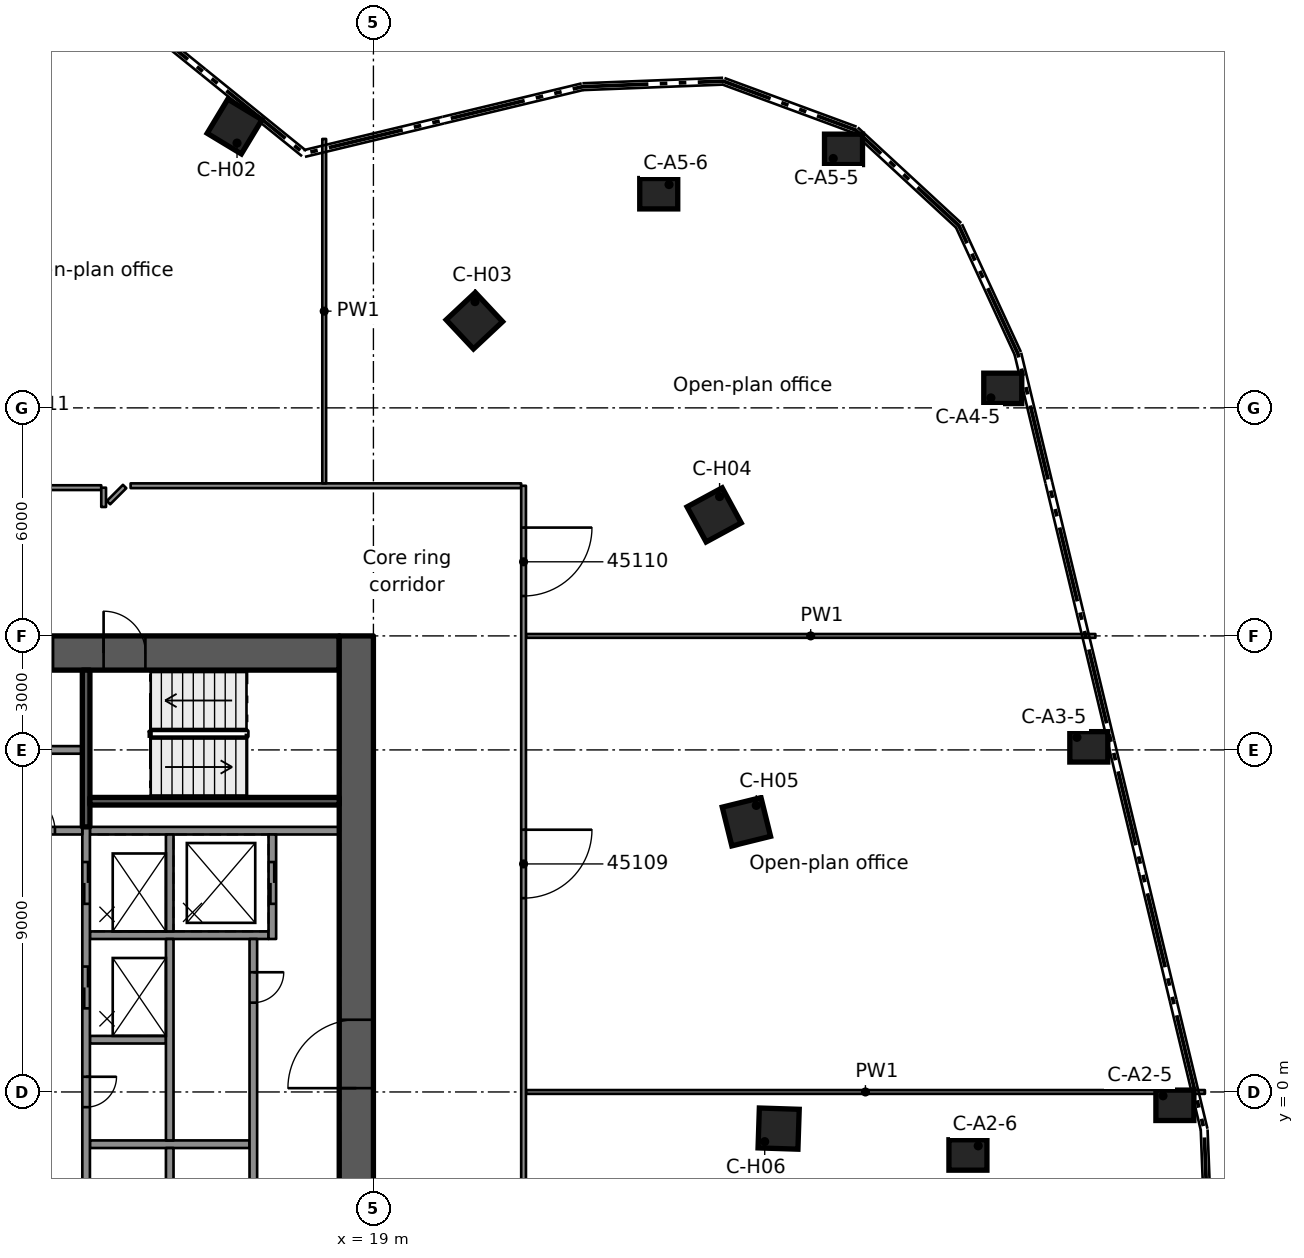
"""IFC4 building model, lengths in metres.
Left out: names, types, materials, properties, quantities, classifications, styles, units other than length and angle.
Written with IfcOpenShell. Run it as: python <this file> out.ifc"""

import sys

from ifc_helpers import new_model, si_unit, direction, frame, frame_2d, origin, origin_2d, place, context, subcontext, project, spatial, rectangle, extrude, element, fill, save


model = new_model("IFC4")
c1 = context("Model", 3, precision=1e-05, world=origin(), true_north=direction((0.0, 1.0)))
c2 = subcontext(c1, "Body", "Model", "MODEL_VIEW")
j1 = project(units=[si_unit("LENGTHUNIT", "METRE"), si_unit("PLANEANGLEUNIT", "RADIAN")], contexts=[c1])
p1 = place(None, origin())
s1 = spatial("IfcSite", under=j1, at=p1, CompositionType="ELEMENT")
p2 = place(p1, origin())
s2 = spatial("IfcBuilding", under=s1, at=p2, CompositionType="ELEMENT")
p3 = place(p2, frame((0.0, 0.0, 221.0)))
s3 = spatial("IfcBuildingStorey", under=s2, at=p3, CompositionType="ELEMENT", Elevation=221.0)
p4 = place(p3, frame((8.9, 11.55, 0.0), z_axis=(0.0, 0.0, 1.0), x_axis=(1.0, 0.0, 0.0)))
e1 = element("IfcWall", 1, at=p4, inside=s3, PredefinedType="SHEAR", context=c2, shape_type="SweptSolid", body=[
    extrude(rectangle(XDim=9.2, YDim=0.9, at=frame_2d((4.6, 0.0))), origin(), (0.0, 0.0, 1.0), 3.5),
])
p5 = place(p4, frame((3.0, 0.0, 0.0)))
e2 = element("IfcOpeningElement", 2, at=p5, cuts=e1, PredefinedType="OPENING", context=c2, shape_type="SweptSolid", body=[
    extrude(rectangle(XDim=1.1, YDim=2.1, at=frame_2d((0.55, 1.05))), frame((0.0, 0.46, 0.0), z_axis=(0.0, -1.0, 0.0), x_axis=(1.0, 0.0, 0.0)), (0.0, 0.0, 1.0), 0.92),
])
p6 = place(p4, frame((0.77, 0.0, 0.0)))
e3 = element("IfcOpeningElement", 3, at=p6, cuts=e1, PredefinedType="OPENING", context=c2, shape_type="SweptSolid", body=[
    extrude(rectangle(XDim=0.9, YDim=2.1, at=frame_2d((0.45, 1.05))), frame((0.0, 0.46, 0.0), z_axis=(0.0, -1.0, 0.0), x_axis=(1.0, 0.0, 0.0)), (0.0, 0.0, 1.0), 0.92),
])
p7 = place(p3, frame((18.55, -12.0, 0.0), z_axis=(0.0, 0.0, 1.0), x_axis=(0.0, 1.0, 0.0)))
e4 = element("IfcWall", 4, at=p7, inside=s3, PredefinedType="SHEAR", context=c2, shape_type="SweptSolid", body=[
    extrude(rectangle(XDim=24.0, YDim=0.9, at=frame_2d((12.0, 0.0))), origin(), (0.0, 0.0, 1.0), 3.5),
])
p8 = place(p7, frame((12.1, 0.0, 0.0)))
e5 = element("IfcOpeningElement", 5, at=p8, cuts=e4, PredefinedType="OPENING", context=c2, shape_type="SweptSolid", body=[
    extrude(rectangle(XDim=1.8, YDim=2.1, at=frame_2d((0.9, 1.05))), frame((0.0, 0.46, 0.0), z_axis=(0.0, -1.0, 0.0), x_axis=(1.0, 0.0, 0.0)), (0.0, 0.0, 1.0), 0.92),
])
for number, where, z_axis, x_axis in (
    (6, (40.09, -0.351, 0.0), (0.0, 0.0, 1.0), (1.0, 0.0, 0.0)),
    (7, (34.644, -1.658, 0.0), (0.0, 0.0, 1.0), (1.0, 0.0, 0.0)),
    (8, (37.825, 9.081, 0.0), (0.0, 0.0, 1.0), (1.0, 0.0, 0.0)),
    (9, (35.561, 18.513, 0.0), (0.0, 0.0, 1.0), (1.0, 0.0, 0.0)),
    (10, (31.37, 24.802, 0.0), (0.0, 0.0, 1.0), (1.0, 0.0, 0.0)),
    (11, (26.508, 23.635, 0.0), (0.0, 0.0, 1.0), (1.0, 0.0, 0.0)),
):
    element("IfcColumn", number, at=place(p3, frame(where, z_axis=z_axis, x_axis=x_axis)), inside=s3, PredefinedType="COLUMN", context=c2, shape_type="SweptSolid", body=[
        extrude(rectangle(XDim=1.0, YDim=0.8, at=origin_2d()), origin(), (0.0, 0.0, 1.0), 3.5),
    ])
for number, where, z_axis, x_axis in (
    (12, (15.347, 25.403, 0.0), (0.0, 0.0, 1.0), (0.517, 0.856, 0.0)),
    (13, (21.657, 20.293, 0.0), (0.0, 0.0, 1.0), (0.73, 0.684, 0.0)),
    (14, (27.966, 15.184, 0.0), (0.0, 0.0, 1.0), (0.879, 0.477, 0.0)),
    (15, (28.815, 7.11, 0.0), (0.0, 0.0, 1.0), (0.971, 0.24, 0.0)),
    (16, (29.663, -0.964, 0.0), (0.0, 0.0, 1.0), (0.999, -0.032, 0.0)),
):
    element("IfcColumn", number, at=place(p3, frame(where, z_axis=z_axis, x_axis=x_axis)), inside=s3, PredefinedType="COLUMN", context=c2, shape_type="SweptSolid", body=[
        extrude(rectangle(XDim=1.05, YDim=1.05, at=origin_2d()), origin(), (0.0, 0.0, 1.0), 3.5),
    ])
p9 = place(p3, frame((11.54, 6.875, 0.0), z_axis=(0.0, 0.0, 1.0), x_axis=(1.0, 0.0, 0.0)))
e17 = element("IfcWall", 17, at=p9, inside=s3, PredefinedType="SOLIDWALL", context=c2, shape_type="SweptSolid", body=[
    extrude(rectangle(XDim=6.56, YDim=0.2, at=frame_2d((3.28, 0.0))), origin(), (0.0, 0.0, 1.0), 3.08),
])
p10 = place(p3, frame((11.54, 4.125, 0.0), z_axis=(0.0, 0.0, 1.0), x_axis=(1.0, 0.0, 0.0)))
e18 = element("IfcWall", 18, at=p10, inside=s3, PredefinedType="SOLIDWALL", context=c2, shape_type="SweptSolid", body=[
    extrude(rectangle(XDim=4.7, YDim=0.2, at=frame_2d((2.35, 0.0))), origin(), (0.0, 0.0, 1.0), 3.08),
])
p11 = place(p3, frame((11.54, 1.375, 0.0), z_axis=(0.0, 0.0, 1.0), x_axis=(1.0, 0.0, 0.0)))
e19 = element("IfcWall", 19, at=p11, inside=s3, PredefinedType="SOLIDWALL", context=c2, shape_type="SweptSolid", body=[
    extrude(rectangle(XDim=2.0, YDim=0.2, at=frame_2d((1.0, 0.0))), origin(), (0.0, 0.0, 1.0), 3.08),
])
p12 = place(p3, frame((11.54, -1.375, 0.0), z_axis=(0.0, 0.0, 1.0), x_axis=(1.0, 0.0, 0.0)))
e20 = element("IfcWall", 20, at=p12, inside=s3, PredefinedType="SOLIDWALL", context=c2, shape_type="SweptSolid", body=[
    extrude(rectangle(XDim=4.2, YDim=0.2, at=frame_2d((2.1, 0.0))), origin(), (0.0, 0.0, 1.0), 3.08),
])
p13 = place(p3, frame((11.44, 6.975, 0.0), z_axis=(0.0, 0.0, 1.0), x_axis=(0.0, -1.0, 0.0)))
e21 = element("IfcWall", 21, at=p13, inside=s3, PredefinedType="SOLIDWALL", context=c2, shape_type="SweptSolid", body=[
    extrude(rectangle(XDim=13.95, YDim=0.2, at=frame_2d((6.975, 0.0))), origin(), (0.0, 0.0, 1.0), 3.08),
])
p14 = place(p13, frame((0.925, 0.0, 0.0)))
e22 = element("IfcOpeningElement", 22, at=p14, cuts=e21, PredefinedType="OPENING", context=c2, shape_type="SweptSolid", body=[
    extrude(rectangle(XDim=1.1, YDim=2.1, at=frame_2d((0.55, 1.05))), frame((0.0, 0.11, 0.0), z_axis=(0.0, -1.0, 0.0), x_axis=(1.0, 0.0, 0.0)), (0.0, 0.0, 1.0), 0.22),
])
p15 = place(p13, frame((3.675, 0.0, 0.0)))
e23 = element("IfcOpeningElement", 23, at=p15, cuts=e21, PredefinedType="OPENING", context=c2, shape_type="SweptSolid", body=[
    extrude(rectangle(XDim=1.1, YDim=2.1, at=frame_2d((0.55, 1.05))), frame((0.0, 0.11, 0.0), z_axis=(0.0, -1.0, 0.0), x_axis=(1.0, 0.0, 0.0)), (0.0, 0.0, 1.0), 0.22),
])
p16 = place(p13, frame((11.925, 0.0, 0.0)))
e24 = element("IfcOpeningElement", 24, at=p16, cuts=e21, PredefinedType="OPENING", context=c2, shape_type="SweptSolid", body=[
    extrude(rectangle(XDim=1.1, YDim=2.1, at=frame_2d((0.55, 1.05))), frame((0.0, 0.11, 0.0), z_axis=(0.0, -1.0, 0.0), x_axis=(1.0, 0.0, 0.0)), (0.0, 0.0, 1.0), 0.22),
])
p17 = place(p13, frame((6.575, 0.0, 0.0)))
e25 = element("IfcOpeningElement", 25, at=p17, cuts=e21, PredefinedType="OPENING", context=c2, shape_type="SweptSolid", body=[
    extrude(rectangle(XDim=0.8, YDim=2.1, at=frame_2d((0.4, 1.05))), frame((0.0, 0.11, 0.0), z_axis=(0.0, -1.0, 0.0), x_axis=(1.0, 0.0, 0.0)), (0.0, 0.0, 1.0), 0.22),
])
p18 = place(p13, frame((9.325, 0.0, 0.0)))
e26 = element("IfcOpeningElement", 26, at=p18, cuts=e21, PredefinedType="OPENING", context=c2, shape_type="SweptSolid", body=[
    extrude(rectangle(XDim=0.8, YDim=2.1, at=frame_2d((0.4, 1.05))), frame((0.0, 0.11, 0.0), z_axis=(0.0, -1.0, 0.0), x_axis=(1.0, 0.0, 0.0)), (0.0, 0.0, 1.0), 0.22),
])
p19 = place(p3, frame((13.64, 6.775, 0.0), z_axis=(0.0, 0.0, 1.0), x_axis=(0.0, -1.0, 0.0)))
e27 = element("IfcWall", 27, at=p19, inside=s3, PredefinedType="SOLIDWALL", context=c2, shape_type="SweptSolid", body=[
    extrude(rectangle(XDim=2.55, YDim=0.2, at=frame_2d((1.275, 0.0))), origin(), (0.0, 0.0, 1.0), 3.08),
])
p20 = place(p3, frame((13.64, 4.025, 0.0), z_axis=(0.0, 0.0, 1.0), x_axis=(0.0, -1.0, 0.0)))
e28 = element("IfcWall", 28, at=p20, inside=s3, PredefinedType="SOLIDWALL", context=c2, shape_type="SweptSolid", body=[
    extrude(rectangle(XDim=5.3, YDim=0.2, at=frame_2d((2.65, 0.0))), origin(), (0.0, 0.0, 1.0), 3.08),
])
p21 = place(p3, frame((13.64, -1.475, 0.0), z_axis=(0.0, 0.0, 1.0), x_axis=(0.0, -1.0, 0.0)))
e29 = element("IfcWall", 29, at=p21, inside=s3, PredefinedType="SOLIDWALL", context=c2, shape_type="SweptSolid", body=[
    extrude(rectangle(XDim=2.55, YDim=0.2, at=frame_2d((1.275, 0.0))), origin(), (0.0, 0.0, 1.0), 3.08),
])
p22 = place(p3, frame((16.34, 6.775, 0.0), z_axis=(0.0, 0.0, 1.0), x_axis=(0.0, -1.0, 0.0)))
e30 = element("IfcWall", 30, at=p22, inside=s3, PredefinedType="SOLIDWALL", context=c2, shape_type="SweptSolid", body=[
    extrude(rectangle(XDim=2.75, YDim=0.2, at=frame_2d((1.375, 0.0))), origin(), (0.0, 0.0, 1.0), 3.08),
])
p23 = place(p22, frame((0.725, 0.0, 0.0)))
e31 = element("IfcOpeningElement", 31, at=p23, cuts=e30, PredefinedType="OPENING", context=c2, shape_type="SweptSolid", body=[
    extrude(rectangle(XDim=1.1, YDim=2.1, at=frame_2d((0.55, 1.05))), frame((0.0, 0.11, 0.0), z_axis=(0.0, -1.0, 0.0), x_axis=(1.0, 0.0, 0.0)), (0.0, 0.0, 1.0), 0.22),
])
p24 = place(p3, frame((15.84, 4.025, 0.0), z_axis=(0.0, 0.0, 1.0), x_axis=(0.0, -1.0, 0.0)))
e32 = element("IfcWall", 32, at=p24, inside=s3, PredefinedType="SOLIDWALL", context=c2, shape_type="SweptSolid", body=[
    extrude(rectangle(XDim=8.25, YDim=0.2, at=frame_2d((4.125, 0.0))), origin(), (0.0, 0.0, 1.0), 3.08),
])
p25 = place(p24, frame((0.875, 0.0, 0.0)))
e33 = element("IfcOpeningElement", 33, at=p25, cuts=e32, PredefinedType="OPENING", context=c2, shape_type="SweptSolid", body=[
    extrude(rectangle(XDim=0.8, YDim=2.1, at=frame_2d((0.4, 1.05))), frame((0.0, 0.11, 0.0), z_axis=(0.0, -1.0, 0.0), x_axis=(1.0, 0.0, 0.0)), (0.0, 0.0, 1.0), 0.22),
])
p26 = place(p24, frame((6.375, 0.0, 0.0)))
e34 = element("IfcOpeningElement", 34, at=p26, cuts=e32, PredefinedType="OPENING", context=c2, shape_type="SweptSolid", body=[
    extrude(rectangle(XDim=0.8, YDim=2.1, at=frame_2d((0.4, 1.05))), frame((0.0, 0.11, 0.0), z_axis=(0.0, -1.0, 0.0), x_axis=(1.0, 0.0, 0.0)), (0.0, 0.0, 1.0), 0.22),
])
p27 = place(p3, frame((11.44, 11.1, 0.0), z_axis=(0.0, 0.0, 1.0), x_axis=(0.0, -1.0, 0.0)))
e35 = element("IfcWall", 35, at=p27, inside=s3, PredefinedType="SOLIDWALL", context=c2, shape_type="SweptSolid", body=[
    extrude(rectangle(XDim=4.125, YDim=0.2, at=frame_2d((2.062, 0.0))), origin(), (0.0, 0.0, 1.0), 3.08),
])
p28 = place(p3, frame((11.54, 7.65, 0.0), z_axis=(0.0, 0.0, 1.0), x_axis=(1.0, 0.0, 0.0)))
e36 = element("IfcWall", 36, at=p28, inside=s3, PredefinedType="SOLIDWALL", context=c2, shape_type="SweptSolid", body=[
    extrude(rectangle(XDim=6.56, YDim=0.2, at=frame_2d((3.28, 0.0))), origin(), (0.0, 0.0, 1.0), 3.08),
])
p29 = place(p3, frame((8.9, 6.875, 0.0), z_axis=(0.0, 0.0, 1.0), x_axis=(1.0, 0.0, 0.0)))
e37 = element("IfcWall", 37, at=p29, inside=s3, PredefinedType="PARTITIONING", context=c2, shape_type="SweptSolid", body=[
    extrude(rectangle(XDim=2.44, YDim=0.2, at=frame_2d((1.22, 0.0))), origin(), (0.0, 0.0, 1.0), 3.08),
])
p30 = place(p29, frame((0.72, 0.0, 0.0)))
e38 = element("IfcOpeningElement", 38, at=p30, cuts=e37, PredefinedType="OPENING", context=c2, shape_type="SweptSolid", body=[
    extrude(rectangle(XDim=1.0, YDim=2.1, at=frame_2d((0.5, 1.05))), frame((0.0, 0.11, 0.0), z_axis=(0.0, -1.0, 0.0), x_axis=(1.0, 0.0, 0.0)), (0.0, 0.0, 1.0), 0.22),
])
p31 = place(p3, frame((8.9, 9.0, 0.0), z_axis=(0.0, 0.0, 1.0), x_axis=(1.0, 0.0, 0.0)))
e39 = element("IfcWall", 39, at=p31, inside=s3, PredefinedType="PARTITIONING", context=c2, shape_type="SweptSolid", body=[
    extrude(rectangle(XDim=2.44, YDim=0.2, at=frame_2d((1.22, 0.0))), origin(), (0.0, 0.0, 1.0), 3.08),
])
p32 = place(p3, frame((23.014, 0.0, 0.0), z_axis=(0.0, 0.0, 1.0), x_axis=(1.0, 0.0, 0.0)))
e40 = element("IfcWall", 40, at=p32, inside=s3, PredefinedType="PARTITIONING", context=c2, shape_type="SweptSolid", body=[
    extrude(rectangle(XDim=17.866, YDim=0.1, at=frame_2d((8.933, 0.0))), origin(), (0.0, 0.0, 1.0), 3.06),
])
p33 = place(p3, frame((23.014, 12.0, 0.0), z_axis=(0.0, 0.0, 1.0), x_axis=(1.0, 0.0, 0.0)))
e41 = element("IfcWall", 41, at=p33, inside=s3, PredefinedType="PARTITIONING", context=c2, shape_type="SweptSolid", body=[
    extrude(rectangle(XDim=14.984, YDim=0.1, at=frame_2d((7.492, 0.0))), origin(), (0.0, 0.0, 1.0), 3.06),
])
p34 = place(p3, frame((-11.838, 15.901, 0.0), z_axis=(0.0, 0.0, 1.0), x_axis=(1.0, 0.0, 0.0)))
e42 = element("IfcWall", 42, at=p34, inside=s3, PredefinedType="PARTITIONING", context=c2, shape_type="SweptSolid", body=[
    extrude(rectangle(XDim=23.676, YDim=0.125, at=frame_2d((11.838, 0.0))), origin(), (0.0, 0.0, 1.0), 3.06),
])
p35 = place(p34, frame((19.886, 0.0, 0.0)))
e43 = element("IfcOpeningElement", 43, at=p35, cuts=e42, PredefinedType="OPENING", context=c2, shape_type="SweptSolid", body=[
    extrude(rectangle(XDim=1.8, YDim=2.1, at=frame_2d((0.9, 1.05))), frame((0.0, 0.073, 0.0), z_axis=(0.0, -1.0, 0.0), x_axis=(1.0, 0.0, 0.0)), (0.0, 0.0, 1.0), 0.145),
])
p36 = place(p34, frame((14.188, 0.0, 0.0)))
e44 = element("IfcOpeningElement", 44, at=p36, cuts=e42, PredefinedType="OPENING", context=c2, shape_type="SweptSolid", body=[
    extrude(rectangle(XDim=1.1, YDim=2.1, at=frame_2d((0.55, 1.05))), frame((0.0, 0.073, 0.0), z_axis=(0.0, -1.0, 0.0), x_axis=(1.0, 0.0, 0.0)), (0.0, 0.0, 1.0), 0.145),
])
p37 = place(p34, frame((8.239, 0.0, 0.0)))
e45 = element("IfcOpeningElement", 45, at=p37, cuts=e42, PredefinedType="OPENING", context=c2, shape_type="SweptSolid", body=[
    extrude(rectangle(XDim=1.1, YDim=2.1, at=frame_2d((0.55, 1.05))), frame((0.0, 0.073, 0.0), z_axis=(0.0, -1.0, 0.0), x_axis=(1.0, 0.0, 0.0)), (0.0, 0.0, 1.0), 0.145),
])
p38 = place(p3, frame((12.611, 15.951, 0.0), z_axis=(0.0, 0.0, 1.0), x_axis=(1.0, 0.0, 0.0)))
e46 = element("IfcWall", 46, at=p38, inside=s3, PredefinedType="PARTITIONING", context=c2, shape_type="SweptSolid", body=[
    extrude(rectangle(XDim=10.276, YDim=0.125, at=frame_2d((5.138, 0.0))), origin(), (0.0, 0.0, 1.0), 3.06),
])
p39 = place(p3, frame((12.029, 15.507, 0.0), z_axis=(0.0, 0.0, 1.0), x_axis=(0.707106781187, 0.707106781187, 0.0)))
e47 = element("IfcWall", 47, at=p39, inside=s3, PredefinedType="PARTITIONING", context=c2, shape_type="SweptSolid", body=[
    extrude(rectangle(XDim=0.599, YDim=0.125, at=frame_2d((0.3, 0.0))), origin(), (0.0, 0.0, 1.0), 3.06),
])
p40 = place(p3, frame((22.951, 15.95, 0.0), z_axis=(0.0, 0.0, 1.0), x_axis=(0.0, -1.0, 0.0)))
e48 = element("IfcWall", 48, at=p40, inside=s3, PredefinedType="PARTITIONING", context=c2, shape_type="SweptSolid", body=[
    extrude(rectangle(XDim=31.828, YDim=0.125, at=frame_2d((15.914, 0.0))), origin(), (0.0, 0.0, 1.0), 3.06),
])
p41 = place(p40, frame((21.05, 0.0, 0.0)))
e49 = element("IfcOpeningElement", 49, at=p41, cuts=e48, PredefinedType="OPENING", context=c2, shape_type="SweptSolid", body=[
    extrude(rectangle(XDim=1.8, YDim=2.1, at=frame_2d((0.9, 1.05))), frame((0.0, 0.073, 0.0), z_axis=(0.0, -1.0, 0.0), x_axis=(1.0, 0.0, 0.0)), (0.0, 0.0, 1.0), 0.145),
])
p42 = place(p40, frame((9.05, 0.0, 0.0)))
e50 = element("IfcOpeningElement", 50, at=p42, cuts=e48, PredefinedType="OPENING", context=c2, shape_type="SweptSolid", body=[
    extrude(rectangle(XDim=1.8, YDim=2.1, at=frame_2d((0.9, 1.05))), frame((0.0, 0.073, 0.0), z_axis=(0.0, -1.0, 0.0), x_axis=(1.0, 0.0, 0.0)), (0.0, 0.0, 1.0), 0.145),
])
p43 = place(p40, frame((1.1, 0.0, 0.0)))
e51 = element("IfcOpeningElement", 51, at=p43, cuts=e48, PredefinedType="OPENING", context=c2, shape_type="SweptSolid", body=[
    extrude(rectangle(XDim=1.8, YDim=2.1, at=frame_2d((0.9, 1.05))), frame((0.0, 0.073, 0.0), z_axis=(0.0, -1.0, 0.0), x_axis=(1.0, 0.0, 0.0)), (0.0, 0.0, 1.0), 0.145),
])
p44 = place(p3, frame((17.705, 16.014, 0.0), z_axis=(0.0, 0.0, 1.0), x_axis=(0.0, 1.0, 0.0)))
e52 = element("IfcWall", 52, at=p44, inside=s3, PredefinedType="PARTITIONING", context=c2, shape_type="SweptSolid", body=[
    extrude(rectangle(XDim=9.062, YDim=0.1, at=frame_2d((4.531, 0.0))), origin(), (0.0, 0.0, 1.0), 3.06),
])
p45 = place(p3, frame((11.901, 15.392, 0.0), z_axis=(0.0, 0.0, 1.0), x_axis=(0.0, 1.0, 0.0)))
e53 = element("IfcWall", 53, at=p45, inside=s3, PredefinedType="PARTITIONING", context=c2, shape_type="SweptSolid", body=[
    extrude(rectangle(XDim=0.508, YDim=0.125, at=frame_2d((0.254, 0.0))), origin(), (0.0, 0.0, 1.0), 3.06),
])
p46 = place(p14, origin())
e54 = element("IfcDoor", 54, at=p46, inside=s3, OperationType="DOUBLE_DOOR_SLIDING", PredefinedType="DOOR", context=c2, shape_type="SweptSolid", body=[
    extrude(rectangle(XDim=1.1, YDim=2.1, at=frame_2d((0.55, 1.05))), frame((0.0, 0.025, 0.0), z_axis=(0.0, -1.0, 0.0), x_axis=(1.0, 0.0, 0.0)), (0.0, 0.0, 1.0), 0.05),
])
fill(e22, e54)
p47 = place(p23, origin())
e55 = element("IfcDoor", 55, at=p47, inside=s3, OperationType="DOUBLE_DOOR_SLIDING", PredefinedType="DOOR", context=c2, shape_type="SweptSolid", body=[
    extrude(rectangle(XDim=1.1, YDim=2.1, at=frame_2d((0.55, 1.05))), frame((0.0, 0.025, 0.0), z_axis=(0.0, -1.0, 0.0), x_axis=(1.0, 0.0, 0.0)), (0.0, 0.0, 1.0), 0.05),
])
fill(e31, e55)
p48 = place(p15, origin())
e56 = element("IfcDoor", 56, at=p48, inside=s3, OperationType="DOUBLE_DOOR_SLIDING", PredefinedType="DOOR", context=c2, shape_type="SweptSolid", body=[
    extrude(rectangle(XDim=1.1, YDim=2.1, at=frame_2d((0.55, 1.05))), frame((0.0, 0.025, 0.0), z_axis=(0.0, -1.0, 0.0), x_axis=(1.0, 0.0, 0.0)), (0.0, 0.0, 1.0), 0.05),
])
fill(e23, e56)
p49 = place(p25, origin())
e57 = element("IfcDoor", 57, at=p49, inside=s3, OperationType="SINGLE_SWING_LEFT", PredefinedType="DOOR", context=c2, shape_type="SweptSolid", body=[
    extrude(rectangle(XDim=0.8, YDim=2.1, at=frame_2d((0.4, 1.05))), frame((0.0, 0.025, 0.0), z_axis=(0.0, -1.0, 0.0), x_axis=(1.0, 0.0, 0.0)), (0.0, 0.0, 1.0), 0.05),
])
fill(e33, e57)
p50 = place(p17, origin())
e58 = element("IfcDoor", 58, at=p50, inside=s3, OperationType="SINGLE_SWING_LEFT", PredefinedType="DOOR", context=c2, shape_type="SweptSolid", body=[
    extrude(rectangle(XDim=0.8, YDim=2.1, at=frame_2d((0.4, 1.05))), frame((0.0, 0.025, 0.0), z_axis=(0.0, -1.0, 0.0), x_axis=(1.0, 0.0, 0.0)), (0.0, 0.0, 1.0), 0.05),
])
fill(e25, e58)
p51 = place(p8, origin())
e59 = element("IfcDoor", 59, at=p51, inside=s3, OperationType="SINGLE_SWING_RIGHT", PredefinedType="DOOR", context=c2, shape_type="SweptSolid", body=[
    extrude(rectangle(XDim=1.8, YDim=2.1, at=frame_2d((0.9, 1.05))), frame((0.0, 0.025, 0.0), z_axis=(0.0, -1.0, 0.0), x_axis=(1.0, 0.0, 0.0)), (0.0, 0.0, 1.0), 0.05),
])
fill(e5, e59)
p52 = place(p5, origin())
e60 = element("IfcDoor", 60, at=p52, inside=s3, OperationType="SINGLE_SWING_LEFT", PredefinedType="DOOR", context=c2, shape_type="SweptSolid", body=[
    extrude(rectangle(XDim=1.1, YDim=2.1, at=frame_2d((0.55, 1.05))), frame((0.0, 0.025, 0.0), z_axis=(0.0, -1.0, 0.0), x_axis=(1.0, 0.0, 0.0)), (0.0, 0.0, 1.0), 0.05),
])
fill(e2, e60)
p53 = place(p6, origin())
e61 = element("IfcDoor", 61, at=p53, inside=s3, OperationType="SINGLE_SWING_LEFT", PredefinedType="DOOR", context=c2, shape_type="SweptSolid", body=[
    extrude(rectangle(XDim=0.9, YDim=2.1, at=frame_2d((0.45, 1.05))), frame((0.0, 0.025, 0.0), z_axis=(0.0, -1.0, 0.0), x_axis=(1.0, 0.0, 0.0)), (0.0, 0.0, 1.0), 0.05),
])
fill(e3, e61)
p54 = place(p30, origin())
e62 = element("IfcDoor", 62, at=p54, inside=s3, OperationType="SINGLE_SWING_RIGHT", PredefinedType="DOOR", context=c2, shape_type="SweptSolid", body=[
    extrude(rectangle(XDim=1.0, YDim=2.1, at=frame_2d((0.5, 1.05))), frame((0.0, 0.025, 0.0), z_axis=(0.0, -1.0, 0.0), x_axis=(1.0, 0.0, 0.0)), (0.0, 0.0, 1.0), 0.05),
])
fill(e38, e62)
p55 = place(p42, origin())
e63 = element("IfcDoor", 63, at=p55, inside=s3, OperationType="DOUBLE_DOOR_SINGLE_SWING", PredefinedType="DOOR", context=c2, shape_type="SweptSolid", body=[
    extrude(rectangle(XDim=1.8, YDim=2.1, at=frame_2d((0.9, 1.05))), frame((0.0, 0.025, 0.0), z_axis=(0.0, -1.0, 0.0), x_axis=(1.0, 0.0, 0.0)), (0.0, 0.0, 1.0), 0.05),
])
fill(e50, e63)
p56 = place(p43, origin())
e64 = element("IfcDoor", 64, at=p56, inside=s3, OperationType="DOUBLE_DOOR_SINGLE_SWING", PredefinedType="DOOR", context=c2, shape_type="SweptSolid", body=[
    extrude(rectangle(XDim=1.8, YDim=2.1, at=frame_2d((0.9, 1.05))), frame((0.0, 0.025, 0.0), z_axis=(0.0, -1.0, 0.0), x_axis=(1.0, 0.0, 0.0)), (0.0, 0.0, 1.0), 0.05),
])
fill(e51, e64)
save(model, sys.argv[1])
